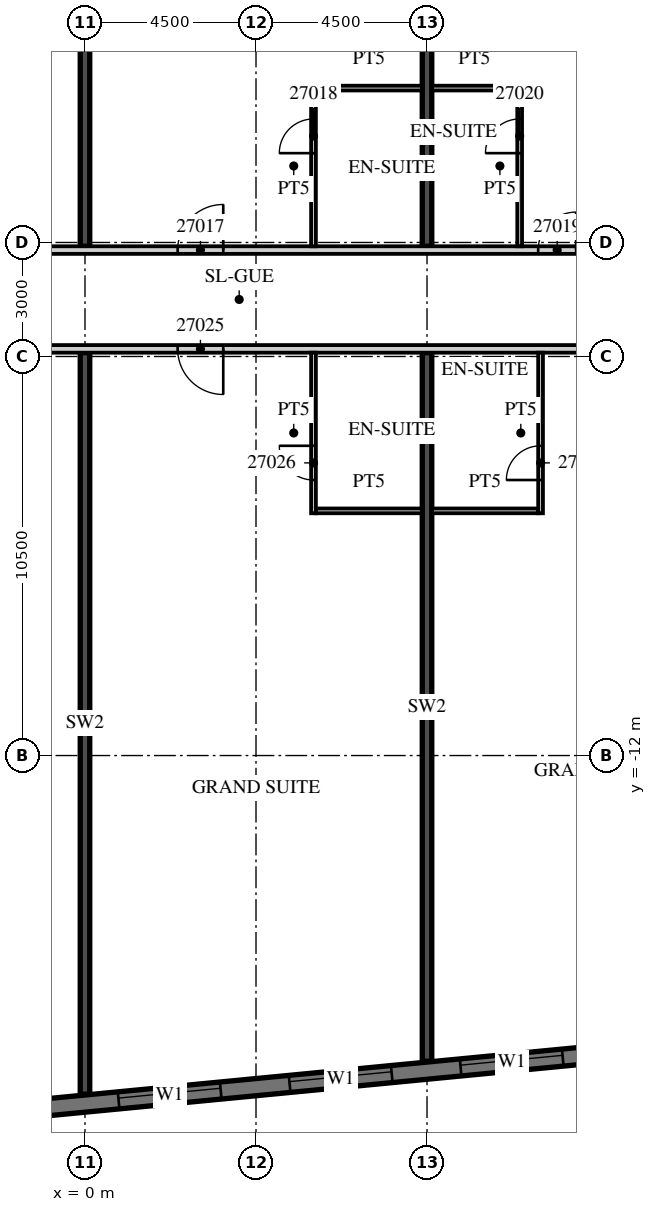
"""IFC4 building model, lengths in metres.
Left out: names, types, materials, properties, quantities, classifications, styles, units other than length and angle.
Written with IfcOpenShell. Run it as: python <this file> out.ifc"""

import sys

from ifc_helpers import new_model, si_unit, direction, frame, frame_2d, origin, place, context, subcontext, project, spatial, rectangle, extrude, element, fill, save


model = new_model("IFC4")
c1 = context("Model", 3, precision=1e-05, world=origin(), true_north=direction((0.0, 1.0)))
c2 = subcontext(c1, "Body", "Model", "MODEL_VIEW")
j1 = project(units=[si_unit("LENGTHUNIT", "METRE"), si_unit("PLANEANGLEUNIT", "RADIAN")], contexts=[c1])
p1 = place(None, origin())
s1 = spatial("IfcSite", under=j1, at=p1, CompositionType="ELEMENT")
p2 = place(p1, origin())
s2 = spatial("IfcBuilding", under=s1, at=p2, CompositionType="ELEMENT")
p3 = place(p2, frame((0.0, 0.0, 124.0)))
s3 = spatial("IfcBuildingStorey", under=s2, at=p3, CompositionType="ELEMENT", Elevation=124.0)
p4 = place(p3, frame((0.0, -20.91, 0.0), z_axis=(0.0, 0.0, 1.0), x_axis=(0.0, 1.0, 0.0)))
e1 = element("IfcWall", 1, at=p4, inside=s3, PredefinedType="SHEAR", context=c2, shape_type="SweptSolid", body=[
    extrude(rectangle(XDim=19.51, YDim=0.25, at=frame_2d((9.755, 0.0))), origin(), (0.0, 0.0, 1.0), 3.3),
])
p5 = place(p3, frame((0.0, 1.4, 0.0), z_axis=(0.0, 0.0, 1.0), x_axis=(0.0, 1.0, 0.0)))
e2 = element("IfcWall", 2, at=p5, inside=s3, PredefinedType="SHEAR", context=c2, shape_type="SweptSolid", body=[
    extrude(rectangle(XDim=19.94, YDim=0.25, at=frame_2d((9.97, 0.0))), origin(), (0.0, 0.0, 1.0), 3.3),
])
p6 = place(p3, frame((9.0, -20.044, 0.0), z_axis=(0.0, 0.0, 1.0), x_axis=(0.0, 1.0, 0.0)))
e3 = element("IfcWall", 3, at=p6, inside=s3, PredefinedType="SHEAR", context=c2, shape_type="SweptSolid", body=[
    extrude(rectangle(XDim=18.644, YDim=0.25, at=frame_2d((9.322, 0.0))), origin(), (0.0, 0.0, 1.0), 3.3),
])
p7 = place(p3, frame((9.0, 1.4, 0.0), z_axis=(0.0, 0.0, 1.0), x_axis=(0.0, 1.0, 0.0)))
e4 = element("IfcWall", 4, at=p7, inside=s3, PredefinedType="SHEAR", context=c2, shape_type="SweptSolid", body=[
    extrude(rectangle(XDim=20.807, YDim=0.25, at=frame_2d((10.403, 0.0))), origin(), (0.0, 0.0, 1.0), 3.3),
])
p8 = place(p3, frame((-13.521, -22.46, 0.0), z_axis=(0.0, 0.0, 1.0), x_axis=(0.995396096335, 0.095846812164, 0.0)))
e5 = element("IfcWall", 5, at=p8, inside=s3, PredefinedType="SOLIDWALL", context=c2, shape_type="SweptSolid", body=[
    extrude(rectangle(XDim=59.151, YDim=0.45, at=frame_2d((29.575, 0.0))), origin(), (0.0, 0.0, 1.0), 3.02),
])
p9 = place(p8, frame((0.91, 0.0, 0.45)))
e6 = element("IfcOpeningElement", 6, at=p9, cuts=e5, PredefinedType="OPENING", context=c2, shape_type="SweptSolid", body=[
    extrude(rectangle(XDim=2.7, YDim=2.25, at=frame_2d((1.35, 1.125))), frame((0.0, 0.235, 0.0), z_axis=(0.0, -1.0, 0.0), x_axis=(1.0, 0.0, 0.0)), (0.0, 0.0, 1.0), 0.47),
])
p10 = place(p8, frame((5.431, 0.0, 0.45)))
e7 = element("IfcOpeningElement", 7, at=p10, cuts=e5, PredefinedType="OPENING", context=c2, shape_type="SweptSolid", body=[
    extrude(rectangle(XDim=2.7, YDim=2.25, at=frame_2d((1.35, 1.125))), frame((0.0, 0.235, 0.0), z_axis=(0.0, -1.0, 0.0), x_axis=(1.0, 0.0, 0.0)), (0.0, 0.0, 1.0), 0.47),
])
p11 = place(p8, frame((9.952, 0.0, 0.45)))
e8 = element("IfcOpeningElement", 8, at=p11, cuts=e5, PredefinedType="OPENING", context=c2, shape_type="SweptSolid", body=[
    extrude(rectangle(XDim=2.7, YDim=2.25, at=frame_2d((1.35, 1.125))), frame((0.0, 0.235, 0.0), z_axis=(0.0, -1.0, 0.0), x_axis=(1.0, 0.0, 0.0)), (0.0, 0.0, 1.0), 0.47),
])
p12 = place(p8, frame((14.473, 0.0, 0.45)))
e9 = element("IfcOpeningElement", 9, at=p12, cuts=e5, PredefinedType="OPENING", context=c2, shape_type="SweptSolid", body=[
    extrude(rectangle(XDim=2.7, YDim=2.25, at=frame_2d((1.35, 1.125))), frame((0.0, 0.235, 0.0), z_axis=(0.0, -1.0, 0.0), x_axis=(1.0, 0.0, 0.0)), (0.0, 0.0, 1.0), 0.47),
])
p13 = place(p8, frame((18.994, 0.0, 0.45)))
e10 = element("IfcOpeningElement", 10, at=p13, cuts=e5, PredefinedType="OPENING", context=c2, shape_type="SweptSolid", body=[
    extrude(rectangle(XDim=2.7, YDim=2.25, at=frame_2d((1.35, 1.125))), frame((0.0, 0.235, 0.0), z_axis=(0.0, -1.0, 0.0), x_axis=(1.0, 0.0, 0.0)), (0.0, 0.0, 1.0), 0.47),
])
p14 = place(p8, frame((23.514, 0.0, 0.45)))
e11 = element("IfcOpeningElement", 11, at=p14, cuts=e5, PredefinedType="OPENING", context=c2, shape_type="SweptSolid", body=[
    extrude(rectangle(XDim=2.7, YDim=2.25, at=frame_2d((1.35, 1.125))), frame((0.0, 0.235, 0.0), z_axis=(0.0, -1.0, 0.0), x_axis=(1.0, 0.0, 0.0)), (0.0, 0.0, 1.0), 0.47),
])
p15 = place(p8, frame((28.035, 0.0, 0.45)))
e12 = element("IfcOpeningElement", 12, at=p15, cuts=e5, PredefinedType="OPENING", context=c2, shape_type="SweptSolid", body=[
    extrude(rectangle(XDim=2.7, YDim=2.25, at=frame_2d((1.35, 1.125))), frame((0.0, 0.235, 0.0), z_axis=(0.0, -1.0, 0.0), x_axis=(1.0, 0.0, 0.0)), (0.0, 0.0, 1.0), 0.47),
])
p16 = place(p8, frame((32.556, 0.0, 0.45)))
e13 = element("IfcOpeningElement", 13, at=p16, cuts=e5, PredefinedType="OPENING", context=c2, shape_type="SweptSolid", body=[
    extrude(rectangle(XDim=2.7, YDim=2.25, at=frame_2d((1.35, 1.125))), frame((0.0, 0.235, 0.0), z_axis=(0.0, -1.0, 0.0), x_axis=(1.0, 0.0, 0.0)), (0.0, 0.0, 1.0), 0.47),
])
p17 = place(p8, frame((37.077, 0.0, 0.45)))
e14 = element("IfcOpeningElement", 14, at=p17, cuts=e5, PredefinedType="OPENING", context=c2, shape_type="SweptSolid", body=[
    extrude(rectangle(XDim=2.7, YDim=2.25, at=frame_2d((1.35, 1.125))), frame((0.0, 0.235, 0.0), z_axis=(0.0, -1.0, 0.0), x_axis=(1.0, 0.0, 0.0)), (0.0, 0.0, 1.0), 0.47),
])
p18 = place(p8, frame((41.598, 0.0, 0.45)))
e15 = element("IfcOpeningElement", 15, at=p18, cuts=e5, PredefinedType="OPENING", context=c2, shape_type="SweptSolid", body=[
    extrude(rectangle(XDim=2.7, YDim=2.25, at=frame_2d((1.35, 1.125))), frame((0.0, 0.235, 0.0), z_axis=(0.0, -1.0, 0.0), x_axis=(1.0, 0.0, 0.0)), (0.0, 0.0, 1.0), 0.47),
])
p19 = place(p8, frame((46.118, 0.0, 0.45)))
e16 = element("IfcOpeningElement", 16, at=p19, cuts=e5, PredefinedType="OPENING", context=c2, shape_type="SweptSolid", body=[
    extrude(rectangle(XDim=2.7, YDim=2.25, at=frame_2d((1.35, 1.125))), frame((0.0, 0.235, 0.0), z_axis=(0.0, -1.0, 0.0), x_axis=(1.0, 0.0, 0.0)), (0.0, 0.0, 1.0), 0.47),
])
p20 = place(p8, frame((50.639, 0.0, 0.45)))
e17 = element("IfcOpeningElement", 17, at=p20, cuts=e5, PredefinedType="OPENING", context=c2, shape_type="SweptSolid", body=[
    extrude(rectangle(XDim=2.7, YDim=2.25, at=frame_2d((1.35, 1.125))), frame((0.0, 0.235, 0.0), z_axis=(0.0, -1.0, 0.0), x_axis=(1.0, 0.0, 0.0)), (0.0, 0.0, 1.0), 0.47),
])
p21 = place(p8, frame((55.15, 0.0, 0.45)))
e18 = element("IfcOpeningElement", 18, at=p21, cuts=e5, PredefinedType="OPENING", context=c2, shape_type="SweptSolid", body=[
    extrude(rectangle(XDim=2.7, YDim=2.25, at=frame_2d((1.35, 1.125))), frame((0.0, 0.235, 0.0), z_axis=(0.0, -1.0, 0.0), x_axis=(1.0, 0.0, 0.0)), (0.0, 0.0, 1.0), 0.47),
])
p22 = place(p3, frame((-39.316, 1.3, 0.0), z_axis=(0.0, 0.0, 1.0), x_axis=(1.0, 0.0, 0.0)))
e19 = element("IfcWall", 19, at=p22, inside=s3, PredefinedType="PARTITIONING", context=c2, shape_type="SweptSolid", body=[
    extrude(rectangle(XDim=52.816, YDim=0.2, at=frame_2d((26.408, 0.0))), origin(), (0.0, 0.0, 1.0), 3.02),
])
p23 = place(p22, frame((0.15, 0.0, 0.0)))
e20 = element("IfcOpeningElement", 20, at=p23, cuts=e19, PredefinedType="OPENING", context=c2, shape_type="SweptSolid", body=[
    extrude(rectangle(XDim=0.9, YDim=2.1, at=frame_2d((0.45, 1.05))), frame((0.0, 0.11, 0.0), z_axis=(0.0, -1.0, 0.0), x_axis=(1.0, 0.0, 0.0)), (0.0, 0.0, 1.0), 0.22),
])
p24 = place(p22, frame((3.891, 0.0, 0.0)))
e21 = element("IfcOpeningElement", 21, at=p24, cuts=e19, PredefinedType="OPENING", context=c2, shape_type="SweptSolid", body=[
    extrude(rectangle(XDim=1.0, YDim=2.1, at=frame_2d((0.5, 1.05))), frame((0.0, 0.11, 0.0), z_axis=(0.0, -1.0, 0.0), x_axis=(1.0, 0.0, 0.0)), (0.0, 0.0, 1.0), 0.22),
])
p25 = place(p22, frame((10.741, 0.0, 0.0)))
e22 = element("IfcOpeningElement", 22, at=p25, cuts=e19, PredefinedType="OPENING", context=c2, shape_type="SweptSolid", body=[
    extrude(rectangle(XDim=1.0, YDim=2.1, at=frame_2d((0.5, 1.05))), frame((0.0, 0.11, 0.0), z_axis=(0.0, -1.0, 0.0), x_axis=(1.0, 0.0, 0.0)), (0.0, 0.0, 1.0), 0.22),
])
p26 = place(p22, frame((15.266, 0.0, 0.0)))
e23 = element("IfcOpeningElement", 23, at=p26, cuts=e19, PredefinedType="OPENING", context=c2, shape_type="SweptSolid", body=[
    extrude(rectangle(XDim=1.0, YDim=2.1, at=frame_2d((0.5, 1.05))), frame((0.0, 0.11, 0.0), z_axis=(0.0, -1.0, 0.0), x_axis=(1.0, 0.0, 0.0)), (0.0, 0.0, 1.0), 0.22),
])
p27 = place(p22, frame((19.741, 0.0, 0.0)))
e24 = element("IfcOpeningElement", 24, at=p27, cuts=e19, PredefinedType="OPENING", context=c2, shape_type="SweptSolid", body=[
    extrude(rectangle(XDim=1.0, YDim=2.1, at=frame_2d((0.5, 1.05))), frame((0.0, 0.11, 0.0), z_axis=(0.0, -1.0, 0.0), x_axis=(1.0, 0.0, 0.0)), (0.0, 0.0, 1.0), 0.22),
])
p28 = place(p22, frame((26.678, 0.0, 0.0)))
e25 = element("IfcOpeningElement", 25, at=p28, cuts=e19, PredefinedType="OPENING", context=c2, shape_type="SweptSolid", body=[
    extrude(rectangle(XDim=1.2, YDim=2.1, at=frame_2d((0.6, 1.05))), frame((0.0, 0.11, 0.0), z_axis=(0.0, -1.0, 0.0), x_axis=(1.0, 0.0, 0.0)), (0.0, 0.0, 1.0), 0.22),
])
p29 = place(p22, frame((35.678, 0.0, 0.0)))
e26 = element("IfcOpeningElement", 26, at=p29, cuts=e19, PredefinedType="OPENING", context=c2, shape_type="SweptSolid", body=[
    extrude(rectangle(XDim=1.2, YDim=2.1, at=frame_2d((0.6, 1.05))), frame((0.0, 0.11, 0.0), z_axis=(0.0, -1.0, 0.0), x_axis=(1.0, 0.0, 0.0)), (0.0, 0.0, 1.0), 0.22),
])
p30 = place(p22, frame((41.754, 0.0, 0.0)))
e27 = element("IfcOpeningElement", 27, at=p30, cuts=e19, PredefinedType="OPENING", context=c2, shape_type="SweptSolid", body=[
    extrude(rectangle(XDim=1.2, YDim=2.1, at=frame_2d((0.6, 1.05))), frame((0.0, 0.11, 0.0), z_axis=(0.0, -1.0, 0.0), x_axis=(1.0, 0.0, 0.0)), (0.0, 0.0, 1.0), 0.22),
])
p31 = place(p22, frame((51.241, 0.0, 0.0)))
e28 = element("IfcOpeningElement", 28, at=p31, cuts=e19, PredefinedType="OPENING", context=c2, shape_type="SweptSolid", body=[
    extrude(rectangle(XDim=1.0, YDim=2.1, at=frame_2d((0.5, 1.05))), frame((0.0, 0.11, 0.0), z_axis=(0.0, -1.0, 0.0), x_axis=(1.0, 0.0, 0.0)), (0.0, 0.0, 1.0), 0.22),
])
p32 = place(p3, frame((6.013, 1.4, 0.0), z_axis=(0.0, 0.0, 1.0), x_axis=(0.0, 1.0, 0.0)))
e29 = element("IfcWall", 29, at=p32, inside=s3, PredefinedType="PARTITIONING", context=c2, shape_type="SweptSolid", body=[
    extrude(rectangle(XDim=4.225, YDim=0.125, at=frame_2d((2.113, 0.0))), origin(), (0.0, 0.0, 1.0), 3.02),
])
p33 = place(p32, frame((2.45, 0.0, 0.0)))
e30 = element("IfcOpeningElement", 30, at=p33, cuts=e29, PredefinedType="OPENING", context=c2, shape_type="SweptSolid", body=[
    extrude(rectangle(XDim=0.9, YDim=2.1, at=frame_2d((0.45, 1.05))), frame((0.0, 0.073, 0.0), z_axis=(0.0, -1.0, 0.0), x_axis=(1.0, 0.0, 0.0)), (0.0, 0.0, 1.0), 0.145),
])
p34 = place(p3, frame((6.075, 5.562, 0.0), z_axis=(0.0, 0.0, 1.0), x_axis=(1.0, 0.0, 0.0)))
e31 = element("IfcWall", 31, at=p34, inside=s3, PredefinedType="PARTITIONING", context=c2, shape_type="SweptSolid", body=[
    extrude(rectangle(XDim=2.8, YDim=0.125, at=frame_2d((1.4, 0.0))), origin(), (0.0, 0.0, 1.0), 3.02),
])
p35 = place(p3, frame((11.438, 1.4, 0.0), z_axis=(0.0, 0.0, 1.0), x_axis=(0.0, 1.0, 0.0)))
e32 = element("IfcWall", 32, at=p35, inside=s3, PredefinedType="PARTITIONING", context=c2, shape_type="SweptSolid", body=[
    extrude(rectangle(XDim=4.225, YDim=0.125, at=frame_2d((2.113, 0.0))), origin(), (0.0, 0.0, 1.0), 3.02),
])
p36 = place(p35, frame((2.45, 0.0, 0.0)))
e33 = element("IfcOpeningElement", 33, at=p36, cuts=e32, PredefinedType="OPENING", context=c2, shape_type="SweptSolid", body=[
    extrude(rectangle(XDim=0.9, YDim=2.1, at=frame_2d((0.45, 1.05))), frame((0.0, 0.073, 0.0), z_axis=(0.0, -1.0, 0.0), x_axis=(1.0, 0.0, 0.0)), (0.0, 0.0, 1.0), 0.145),
])
p37 = place(p3, frame((9.125, 5.562, 0.0), z_axis=(0.0, 0.0, 1.0), x_axis=(1.0, 0.0, 0.0)))
e34 = element("IfcWall", 34, at=p37, inside=s3, PredefinedType="PARTITIONING", context=c2, shape_type="SweptSolid", body=[
    extrude(rectangle(XDim=2.25, YDim=0.125, at=frame_2d((1.125, 0.0))), origin(), (0.0, 0.0, 1.0), 3.02),
])
p38 = place(p3, frame((-13.5, -1.3, 0.0), z_axis=(0.0, 0.0, 1.0), x_axis=(1.0, 0.0, 0.0)))
e35 = element("IfcWall", 35, at=p38, inside=s3, PredefinedType="PARTITIONING", context=c2, shape_type="SweptSolid", body=[
    extrude(rectangle(XDim=60.932, YDim=0.2, at=frame_2d((30.466, 0.0))), origin(), (0.0, 0.0, 1.0), 3.02),
])
p39 = place(p38, frame((2.925, 0.0, 0.0)))
e36 = element("IfcOpeningElement", 36, at=p39, cuts=e35, PredefinedType="OPENING", context=c2, shape_type="SweptSolid", body=[
    extrude(rectangle(XDim=1.0, YDim=2.1, at=frame_2d((0.5, 1.05))), frame((0.0, 0.11, 0.0), z_axis=(0.0, -1.0, 0.0), x_axis=(1.0, 0.0, 0.0)), (0.0, 0.0, 1.0), 0.22),
])
p40 = place(p38, frame((9.863, 0.0, 0.0)))
e37 = element("IfcOpeningElement", 37, at=p40, cuts=e35, PredefinedType="OPENING", context=c2, shape_type="SweptSolid", body=[
    extrude(rectangle(XDim=1.2, YDim=2.1, at=frame_2d((0.6, 1.05))), frame((0.0, 0.11, 0.0), z_axis=(0.0, -1.0, 0.0), x_axis=(1.0, 0.0, 0.0)), (0.0, 0.0, 1.0), 0.22),
])
p41 = place(p38, frame((15.938, 0.0, 0.0)))
e38 = element("IfcOpeningElement", 38, at=p41, cuts=e35, PredefinedType="OPENING", context=c2, shape_type="SweptSolid", body=[
    extrude(rectangle(XDim=1.2, YDim=2.1, at=frame_2d((0.6, 1.05))), frame((0.0, 0.11, 0.0), z_axis=(0.0, -1.0, 0.0), x_axis=(1.0, 0.0, 0.0)), (0.0, 0.0, 1.0), 0.22),
])
p42 = place(p38, frame((27.862, 0.0, 0.0)))
e39 = element("IfcOpeningElement", 39, at=p42, cuts=e35, PredefinedType="OPENING", context=c2, shape_type="SweptSolid", body=[
    extrude(rectangle(XDim=1.2, YDim=2.1, at=frame_2d((0.6, 1.05))), frame((0.0, 0.11, 0.0), z_axis=(0.0, -1.0, 0.0), x_axis=(1.0, 0.0, 0.0)), (0.0, 0.0, 1.0), 0.22),
])
p43 = place(p38, frame((34.45, 0.0, 0.0)))
e40 = element("IfcOpeningElement", 40, at=p43, cuts=e35, PredefinedType="OPENING", context=c2, shape_type="SweptSolid", body=[
    extrude(rectangle(XDim=1.0, YDim=2.1, at=frame_2d((0.5, 1.05))), frame((0.0, 0.11, 0.0), z_axis=(0.0, -1.0, 0.0), x_axis=(1.0, 0.0, 0.0)), (0.0, 0.0, 1.0), 0.22),
])
p44 = place(p38, frame((36.55, 0.0, 0.0)))
e41 = element("IfcOpeningElement", 41, at=p44, cuts=e35, PredefinedType="OPENING", context=c2, shape_type="SweptSolid", body=[
    extrude(rectangle(XDim=1.0, YDim=2.1, at=frame_2d((0.5, 1.05))), frame((0.0, 0.11, 0.0), z_axis=(0.0, -1.0, 0.0), x_axis=(1.0, 0.0, 0.0)), (0.0, 0.0, 1.0), 0.22),
])
p45 = place(p38, frame((41.075, 0.0, 0.0)))
e42 = element("IfcOpeningElement", 42, at=p45, cuts=e35, PredefinedType="OPENING", context=c2, shape_type="SweptSolid", body=[
    extrude(rectangle(XDim=1.0, YDim=2.1, at=frame_2d((0.5, 1.05))), frame((0.0, 0.11, 0.0), z_axis=(0.0, -1.0, 0.0), x_axis=(1.0, 0.0, 0.0)), (0.0, 0.0, 1.0), 0.22),
])
p46 = place(p38, frame((45.55, 0.0, 0.0)))
e43 = element("IfcOpeningElement", 43, at=p46, cuts=e35, PredefinedType="OPENING", context=c2, shape_type="SweptSolid", body=[
    extrude(rectangle(XDim=1.0, YDim=2.1, at=frame_2d((0.5, 1.05))), frame((0.0, 0.11, 0.0), z_axis=(0.0, -1.0, 0.0), x_axis=(1.0, 0.0, 0.0)), (0.0, 0.0, 1.0), 0.22),
])
p47 = place(p38, frame((50.075, 0.0, 0.0)))
e44 = element("IfcOpeningElement", 44, at=p47, cuts=e35, PredefinedType="OPENING", context=c2, shape_type="SweptSolid", body=[
    extrude(rectangle(XDim=1.0, YDim=2.1, at=frame_2d((0.5, 1.05))), frame((0.0, 0.11, 0.0), z_axis=(0.0, -1.0, 0.0), x_axis=(1.0, 0.0, 0.0)), (0.0, 0.0, 1.0), 0.22),
])
p48 = place(p38, frame((54.575, 0.0, 0.0)))
e45 = element("IfcOpeningElement", 45, at=p48, cuts=e35, PredefinedType="OPENING", context=c2, shape_type="SweptSolid", body=[
    extrude(rectangle(XDim=1.0, YDim=2.1, at=frame_2d((0.5, 1.05))), frame((0.0, 0.11, 0.0), z_axis=(0.0, -1.0, 0.0), x_axis=(1.0, 0.0, 0.0)), (0.0, 0.0, 1.0), 0.22),
])
p49 = place(p38, frame((59.882, 0.0, 0.0)))
e46 = element("IfcOpeningElement", 46, at=p49, cuts=e35, PredefinedType="OPENING", context=c2, shape_type="SweptSolid", body=[
    extrude(rectangle(XDim=0.9, YDim=2.1, at=frame_2d((0.45, 1.05))), frame((0.0, 0.11, 0.0), z_axis=(0.0, -1.0, 0.0), x_axis=(1.0, 0.0, 0.0)), (0.0, 0.0, 1.0), 0.22),
])
p50 = place(p3, frame((6.013, -5.625, 0.0), z_axis=(0.0, 0.0, 1.0), x_axis=(0.0, 1.0, 0.0)))
e47 = element("IfcWall", 47, at=p50, inside=s3, PredefinedType="PARTITIONING", context=c2, shape_type="SweptSolid", body=[
    extrude(rectangle(XDim=4.225, YDim=0.125, at=frame_2d((2.113, 0.0))), origin(), (0.0, 0.0, 1.0), 3.02),
])
p51 = place(p50, frame((0.875, 0.0, 0.0)))
e48 = element("IfcOpeningElement", 48, at=p51, cuts=e47, PredefinedType="OPENING", context=c2, shape_type="SweptSolid", body=[
    extrude(rectangle(XDim=0.9, YDim=2.1, at=frame_2d((0.45, 1.05))), frame((0.0, 0.073, 0.0), z_axis=(0.0, -1.0, 0.0), x_axis=(1.0, 0.0, 0.0)), (0.0, 0.0, 1.0), 0.145),
])
p52 = place(p3, frame((6.075, -5.562, 0.0), z_axis=(0.0, 0.0, 1.0), x_axis=(1.0, 0.0, 0.0)))
e49 = element("IfcWall", 49, at=p52, inside=s3, PredefinedType="PARTITIONING", context=c2, shape_type="SweptSolid", body=[
    extrude(rectangle(XDim=2.8, YDim=0.125, at=frame_2d((1.4, 0.0))), origin(), (0.0, 0.0, 1.0), 3.02),
])
p53 = place(p3, frame((11.988, -5.625, 0.0), z_axis=(0.0, 0.0, 1.0), x_axis=(0.0, 1.0, 0.0)))
e50 = element("IfcWall", 50, at=p53, inside=s3, PredefinedType="PARTITIONING", context=c2, shape_type="SweptSolid", body=[
    extrude(rectangle(XDim=4.225, YDim=0.125, at=frame_2d((2.113, 0.0))), origin(), (0.0, 0.0, 1.0), 3.02),
])
p54 = place(p53, frame((0.875, 0.0, 0.0)))
e51 = element("IfcOpeningElement", 51, at=p54, cuts=e50, PredefinedType="OPENING", context=c2, shape_type="SweptSolid", body=[
    extrude(rectangle(XDim=0.9, YDim=2.1, at=frame_2d((0.45, 1.05))), frame((0.0, 0.073, 0.0), z_axis=(0.0, -1.0, 0.0), x_axis=(1.0, 0.0, 0.0)), (0.0, 0.0, 1.0), 0.145),
])
p55 = place(p3, frame((9.125, -5.562, 0.0), z_axis=(0.0, 0.0, 1.0), x_axis=(1.0, 0.0, 0.0)))
e52 = element("IfcWall", 52, at=p55, inside=s3, PredefinedType="PARTITIONING", context=c2, shape_type="SweptSolid", body=[
    extrude(rectangle(XDim=2.8, YDim=0.125, at=frame_2d((1.4, 0.0))), origin(), (0.0, 0.0, 1.0), 3.02),
])
p56 = place(p12, origin())
e53 = element("IfcWindow", 53, at=p56, inside=s3, PartitioningType="SINGLE_PANEL", PredefinedType="WINDOW", context=c2, shape_type="SweptSolid", body=[
    extrude(rectangle(XDim=2.7, YDim=2.25, at=frame_2d((1.35, 1.125))), frame((0.0, 0.09, 0.0), z_axis=(0.0, -1.0, 0.0), x_axis=(1.0, 0.0, 0.0)), (0.0, 0.0, 1.0), 0.06),
])
fill(e9, e53)
p57 = place(p13, origin())
e54 = element("IfcWindow", 54, at=p57, inside=s3, PartitioningType="SINGLE_PANEL", PredefinedType="WINDOW", context=c2, shape_type="SweptSolid", body=[
    extrude(rectangle(XDim=2.7, YDim=2.25, at=frame_2d((1.35, 1.125))), frame((0.0, 0.09, 0.0), z_axis=(0.0, -1.0, 0.0), x_axis=(1.0, 0.0, 0.0)), (0.0, 0.0, 1.0), 0.06),
])
fill(e10, e54)
p58 = place(p14, origin())
e55 = element("IfcWindow", 55, at=p58, inside=s3, PartitioningType="SINGLE_PANEL", PredefinedType="WINDOW", context=c2, shape_type="SweptSolid", body=[
    extrude(rectangle(XDim=2.7, YDim=2.25, at=frame_2d((1.35, 1.125))), frame((0.0, 0.09, 0.0), z_axis=(0.0, -1.0, 0.0), x_axis=(1.0, 0.0, 0.0)), (0.0, 0.0, 1.0), 0.06),
])
fill(e11, e55)
p59 = place(p30, origin())
e56 = element("IfcDoor", 56, at=p59, inside=s3, OperationType="SINGLE_SWING_RIGHT", PredefinedType="DOOR", context=c2, shape_type="SweptSolid", body=[
    extrude(rectangle(XDim=1.2, YDim=2.1, at=frame_2d((0.6, 1.05))), frame((0.0, 0.025, 0.0), z_axis=(0.0, -1.0, 0.0), x_axis=(1.0, 0.0, 0.0)), (0.0, 0.0, 1.0), 0.05),
])
fill(e27, e56)
p60 = place(p33, origin())
e57 = element("IfcDoor", 57, at=p60, inside=s3, OperationType="SINGLE_SWING_LEFT", PredefinedType="DOOR", context=c2, shape_type="SweptSolid", body=[
    extrude(rectangle(XDim=0.9, YDim=2.1, at=frame_2d((0.45, 1.05))), frame((0.0, 0.025, 0.0), z_axis=(0.0, -1.0, 0.0), x_axis=(1.0, 0.0, 0.0)), (0.0, 0.0, 1.0), 0.05),
])
fill(e30, e57)
p61 = place(p31, origin())
e58 = element("IfcDoor", 58, at=p61, inside=s3, OperationType="SINGLE_SWING_RIGHT", PredefinedType="DOOR", context=c2, shape_type="SweptSolid", body=[
    extrude(rectangle(XDim=1.0, YDim=2.1, at=frame_2d((0.5, 1.05))), frame((0.0, 0.025, 0.0), z_axis=(0.0, -1.0, 0.0), x_axis=(1.0, 0.0, 0.0)), (0.0, 0.0, 1.0), 0.05),
])
fill(e28, e58)
p62 = place(p36, origin())
e59 = element("IfcDoor", 59, at=p62, inside=s3, OperationType="SINGLE_SWING_LEFT", PredefinedType="DOOR", context=c2, shape_type="SweptSolid", body=[
    extrude(rectangle(XDim=0.9, YDim=2.1, at=frame_2d((0.45, 1.05))), frame((0.0, 0.025, 0.0), z_axis=(0.0, -1.0, 0.0), x_axis=(1.0, 0.0, 0.0)), (0.0, 0.0, 1.0), 0.05),
])
fill(e33, e59)
p63 = place(p41, origin())
e60 = element("IfcDoor", 60, at=p63, inside=s3, OperationType="SINGLE_SWING_RIGHT", PredefinedType="DOOR", context=c2, shape_type="SweptSolid", body=[
    extrude(rectangle(XDim=1.2, YDim=2.1, at=frame_2d((0.6, 1.05))), frame((0.0, 0.025, 0.0), z_axis=(0.0, -1.0, 0.0), x_axis=(1.0, 0.0, 0.0)), (0.0, 0.0, 1.0), 0.05),
])
fill(e38, e60)
p64 = place(p51, origin())
e61 = element("IfcDoor", 61, at=p64, inside=s3, OperationType="SINGLE_SWING_RIGHT", PredefinedType="DOOR", context=c2, shape_type="SweptSolid", body=[
    extrude(rectangle(XDim=0.9, YDim=2.1, at=frame_2d((0.45, 1.05))), frame((0.0, 0.025, 0.0), z_axis=(0.0, -1.0, 0.0), x_axis=(1.0, 0.0, 0.0)), (0.0, 0.0, 1.0), 0.05),
])
fill(e48, e61)
p65 = place(p54, origin())
e62 = element("IfcDoor", 62, at=p65, inside=s3, OperationType="SINGLE_SWING_LEFT", PredefinedType="DOOR", context=c2, shape_type="SweptSolid", body=[
    extrude(rectangle(XDim=0.9, YDim=2.1, at=frame_2d((0.45, 1.05))), frame((0.0, 0.025, 0.0), z_axis=(0.0, -1.0, 0.0), x_axis=(1.0, 0.0, 0.0)), (0.0, 0.0, 1.0), 0.05),
])
fill(e51, e62)
save(model, sys.argv[1])
